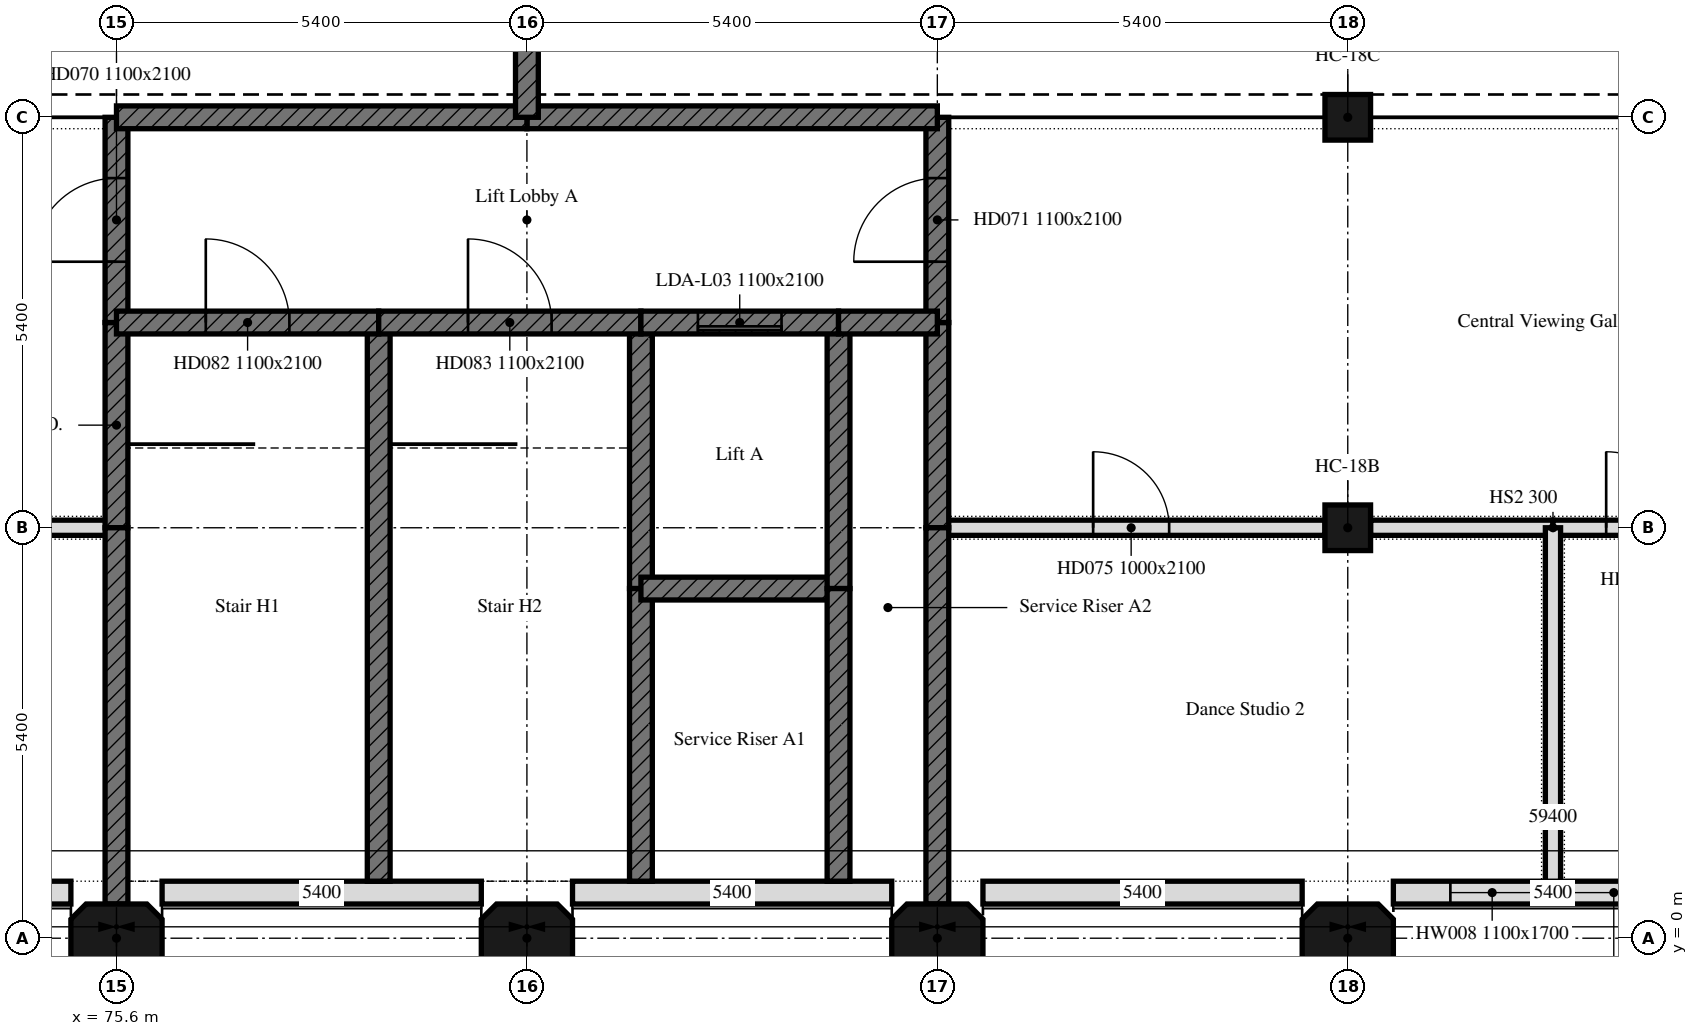
"""IFC4 building model, lengths in metres.
Left out: names, types, materials, properties, quantities, classifications, styles, units other than length and angle.
Written with IfcOpenShell. Run it as: python <this file> out.ifc"""

import sys

from ifc_helpers import new_model, si_unit, direction, frame, frame_2d, origin, origin_2d, place, context, subcontext, project, spatial, polyline, rectangle, outline, extrude, element, fill, save


model = new_model("IFC4")
c1 = context("Model", 3, precision=1e-05, world=origin(), true_north=direction((0.0, 1.0)))
c2 = subcontext(c1, "Body", "Model", "MODEL_VIEW")
j1 = project(units=[si_unit("LENGTHUNIT", "METRE"), si_unit("PLANEANGLEUNIT", "RADIAN")], contexts=[c1])
p1 = place(None, origin())
s1 = spatial("IfcSite", under=j1, at=p1, CompositionType="ELEMENT")
p2 = place(p1, origin())
s2 = spatial("IfcBuilding", under=s1, at=p2, CompositionType="ELEMENT")
p3 = place(p2, frame((0.0, 0.0, 19.8)))
s3 = spatial("IfcBuildingStorey", under=s2, at=p3, CompositionType="ELEMENT", Elevation=19.8)
for number, where, z_axis, x_axis in (
    (1, (75.6, 0.0, 0.0), (0.0, 0.0, 1.0), (1.0, 0.0, 0.0)),
    (2, (81.0, 0.0, 0.0), (0.0, 0.0, 1.0), (1.0, 0.0, 0.0)),
    (3, (86.4, 0.0, 0.0), (0.0, 0.0, 1.0), (1.0, 0.0, 0.0)),
    (4, (91.8, 0.0, 0.0), (0.0, 0.0, 1.0), (1.0, 0.0, 0.0)),
):
    element("IfcColumn", number, at=place(p3, frame(where, z_axis=z_axis, x_axis=x_axis)), inside=s3, PredefinedType="COLUMN", context=c2, shape_type="SweptSolid", body=[
        extrude(outline(polyline([(-0.4, -0.45), (0.4, -0.45), (0.6, -0.25), (0.6, 0.25), (0.4, 0.45), (-0.4, 0.45), (-0.6, 0.25), (-0.6, -0.25), (-0.4, -0.45)])), origin(), (0.0, 0.0, 1.0), 3.802),
    ])
for number, where, z_axis, x_axis in (
    (5, (91.8, 5.4, 0.0), (0.0, 0.0, 1.0), (1.0, 0.0, 0.0)),
    (6, (91.8, 10.8, 0.0), (0.0, 0.0, 1.0), (1.0, 0.0, 0.0)),
):
    element("IfcColumn", number, at=place(p3, frame(where, z_axis=z_axis, x_axis=x_axis)), inside=s3, PredefinedType="COLUMN", context=c2, shape_type="SweptSolid", body=[
        extrude(rectangle(XDim=0.6, YDim=0.6, at=origin_2d()), origin(), (0.0, 0.0, 1.0), 4.8),
    ])
p4 = place(p3, frame((70.8, 0.6, 0.0), z_axis=(0.0, 0.0, 1.0), x_axis=(1.0, 0.0, 0.0)))
e7 = element("IfcWall", 7, at=p4, inside=s3, PredefinedType="SOLIDWALL", context=c2, shape_type="SweptSolid", body=[
    extrude(outline(polyline([(0.0, 0.0), (4.2, 0.0), (4.2, 5.365), (0.0, 5.365), (0.0, 0.0)])), frame((0.0, 0.15, 0.0), z_axis=(0.0, -1.0, 0.0), x_axis=(1.0, 0.0, 0.0)), (0.0, 0.0, 1.0), 0.3),
])
p5 = place(p4, frame((0.4, 0.0, 0.9)))
e8 = element("IfcOpeningElement", 8, at=p5, cuts=e7, PredefinedType="OPENING", context=c2, shape_type="SweptSolid", body=[
    extrude(rectangle(XDim=3.4, YDim=1.7, at=frame_2d((1.7, 0.85))), frame((0.0, 0.15, 0.0), z_axis=(0.0, -1.0, 0.0), x_axis=(1.0, 0.0, 0.0)), (0.0, 0.0, 1.0), 0.3),
])
for number, where, z_axis, x_axis in (
    (9, (76.2, 0.6, 0.0), (0.0, 0.0, 1.0), (1.0, 0.0, 0.0)),
    (10, (81.6, 0.6, 0.0), (0.0, 0.0, 1.0), (1.0, 0.0, 0.0)),
    (11, (87.0, 0.6, 0.0), (0.0, 0.0, 1.0), (1.0, 0.0, 0.0)),
):
    element("IfcWall", number, at=place(p3, frame(where, z_axis=z_axis, x_axis=x_axis)), inside=s3, PredefinedType="SOLIDWALL", context=c2, shape_type="SweptSolid", body=[
        extrude(outline(polyline([(0.0, 0.0), (4.2, 0.0), (4.2, 5.365), (0.0, 5.365), (0.0, 0.0)])), frame((0.0, 0.15, 0.0), z_axis=(0.0, -1.0, 0.0), x_axis=(1.0, 0.0, 0.0)), (0.0, 0.0, 1.0), 0.3),
    ])
p6 = place(p3, frame((92.4, 0.6, 0.0), z_axis=(0.0, 0.0, 1.0), x_axis=(1.0, 0.0, 0.0)))
e12 = element("IfcWall", 12, at=p6, inside=s3, PredefinedType="SOLIDWALL", context=c2, shape_type="SweptSolid", body=[
    extrude(outline(polyline([(0.0, 0.0), (4.2, 0.0), (4.2, 5.365), (0.0, 5.365), (0.0, 0.0)])), frame((0.0, 0.15, 0.0), z_axis=(0.0, -1.0, 0.0), x_axis=(1.0, 0.0, 0.0)), (0.0, 0.0, 1.0), 0.3),
])
p7 = place(p6, frame((0.75, 0.0, 0.9)))
e13 = element("IfcOpeningElement", 13, at=p7, cuts=e12, PredefinedType="OPENING", context=c2, shape_type="SweptSolid", body=[
    extrude(rectangle(XDim=1.1, YDim=1.7, at=frame_2d((0.55, 0.85))), frame((0.0, 0.15, 0.0), z_axis=(0.0, -1.0, 0.0), x_axis=(1.0, 0.0, 0.0)), (0.0, 0.0, 1.0), 0.3),
])
p8 = place(p6, frame((2.35, 0.0, 0.9)))
e14 = element("IfcOpeningElement", 14, at=p8, cuts=e12, PredefinedType="OPENING", context=c2, shape_type="SweptSolid", body=[
    extrude(rectangle(XDim=1.1, YDim=1.7, at=frame_2d((0.55, 0.85))), frame((0.0, 0.15, 0.0), z_axis=(0.0, -1.0, 0.0), x_axis=(1.0, 0.0, 0.0)), (0.0, 0.0, 1.0), 0.3),
])
p9 = place(p3, frame((70.5, 5.4, 0.0), z_axis=(0.0, 0.0, 1.0), x_axis=(1.0, 0.0, 0.0)))
e15 = element("IfcWall", 15, at=p9, inside=s3, PredefinedType="PARTITIONING", context=c2, shape_type="SweptSolid", body=[
    extrude(rectangle(XDim=5.1, YDim=0.2, at=frame_2d((2.55, 0.0))), origin(), (0.0, 0.0, 1.0), 5.317),
])
p10 = place(p3, frame((75.6, 5.4, 0.0), z_axis=(0.0, 0.0, 1.0), x_axis=(0.0, 1.0, 0.0)))
e16 = element("IfcWall", 16, at=p10, inside=s3, PredefinedType="SHEAR", context=c2, shape_type="SweptSolid", body=[
    extrude(outline(polyline([(0.0, 0.0), (2.7, 0.0), (2.7, 6.067), (0.0, 5.344), (0.0, 0.0)])), frame((0.0, 0.15, 0.0), z_axis=(0.0, -1.0, 0.0), x_axis=(1.0, 0.0, 0.0)), (0.0, 0.0, 1.0), 0.3),
])
p11 = place(p3, frame((75.6, 8.1, 0.0), z_axis=(0.0, 0.0, 1.0), x_axis=(0.0, 1.0, 0.0)))
e17 = element("IfcWall", 17, at=p11, inside=s3, PredefinedType="SHEAR", context=c2, shape_type="SweptSolid", body=[
    extrude(outline(polyline([(0.0, 0.0), (2.7, 0.0), (2.7, 6.791), (0.0, 6.067), (0.0, 0.0)])), frame((0.0, 0.15, 0.0), z_axis=(0.0, -1.0, 0.0), x_axis=(1.0, 0.0, 0.0)), (0.0, 0.0, 1.0), 0.3),
])
p12 = place(p11, frame((0.8, 0.0, 0.0)))
e18 = element("IfcOpeningElement", 18, at=p12, cuts=e17, PredefinedType="OPENING", context=c2, shape_type="SweptSolid", body=[
    extrude(rectangle(XDim=1.1, YDim=2.1, at=frame_2d((0.55, 1.05))), frame((0.0, 0.15, 0.0), z_axis=(0.0, -1.0, 0.0), x_axis=(1.0, 0.0, 0.0)), (0.0, 0.0, 1.0), 0.3),
])
p13 = place(p3, frame((86.4, 5.4, 0.0), z_axis=(0.0, 0.0, 1.0), x_axis=(1.0, 0.0, 0.0)))
e19 = element("IfcWall", 19, at=p13, inside=s3, PredefinedType="PARTITIONING", context=c2, shape_type="SweptSolid", body=[
    extrude(rectangle(XDim=5.1, YDim=0.2, at=frame_2d((2.55, 0.0))), origin(), (0.0, 0.0, 1.0), 5.317),
])
p14 = place(p13, frame((2.05, 0.0, 0.0)))
e20 = element("IfcOpeningElement", 20, at=p14, cuts=e19, PredefinedType="OPENING", context=c2, shape_type="SweptSolid", body=[
    extrude(rectangle(XDim=1.0, YDim=2.1, at=frame_2d((0.5, 1.05))), frame((0.0, 0.1, 0.0), z_axis=(0.0, -1.0, 0.0), x_axis=(1.0, 0.0, 0.0)), (0.0, 0.0, 1.0), 0.2),
])
p15 = place(p3, frame((92.1, 5.4, 0.0), z_axis=(0.0, 0.0, 1.0), x_axis=(1.0, 0.0, 0.0)))
e21 = element("IfcWall", 21, at=p15, inside=s3, PredefinedType="PARTITIONING", context=c2, shape_type="SweptSolid", body=[
    extrude(rectangle(XDim=2.4, YDim=0.2, at=frame_2d((1.2, 0.0))), origin(), (0.0, 0.0, 1.0), 5.317),
])
p16 = place(p3, frame((94.5, 5.4, 0.0), z_axis=(0.0, 0.0, 1.0), x_axis=(1.0, 0.0, 0.0)))
e22 = element("IfcWall", 22, at=p16, inside=s3, PredefinedType="PARTITIONING", context=c2, shape_type="SweptSolid", body=[
    extrude(rectangle(XDim=2.4, YDim=0.2, at=frame_2d((1.2, 0.0))), origin(), (0.0, 0.0, 1.0), 5.317),
])
p17 = place(p16, frame((0.7, 0.0, 0.0)))
e23 = element("IfcOpeningElement", 23, at=p17, cuts=e22, PredefinedType="OPENING", context=c2, shape_type="SweptSolid", body=[
    extrude(rectangle(XDim=1.0, YDim=2.1, at=frame_2d((0.5, 1.05))), frame((0.0, 0.1, 0.0), z_axis=(0.0, -1.0, 0.0), x_axis=(1.0, 0.0, 0.0)), (0.0, 0.0, 1.0), 0.2),
])
p18 = place(p3, frame((86.4, 5.4, 0.0), z_axis=(0.0, 0.0, 1.0), x_axis=(0.0, 1.0, 0.0)))
e24 = element("IfcWall", 24, at=p18, inside=s3, PredefinedType="SHEAR", context=c2, shape_type="SweptSolid", body=[
    extrude(outline(polyline([(0.0, 0.0), (2.7, 0.0), (2.7, 6.067), (0.0, 5.344), (0.0, 0.0)])), frame((0.0, 0.15, 0.0), z_axis=(0.0, -1.0, 0.0), x_axis=(1.0, 0.0, 0.0)), (0.0, 0.0, 1.0), 0.3),
])
p19 = place(p3, frame((86.4, 8.1, 0.0), z_axis=(0.0, 0.0, 1.0), x_axis=(0.0, 1.0, 0.0)))
e25 = element("IfcWall", 25, at=p19, inside=s3, PredefinedType="SHEAR", context=c2, shape_type="SweptSolid", body=[
    extrude(outline(polyline([(0.0, 0.0), (2.7, 0.0), (2.7, 6.791), (0.0, 6.067), (0.0, 0.0)])), frame((0.0, 0.15, 0.0), z_axis=(0.0, -1.0, 0.0), x_axis=(1.0, 0.0, 0.0)), (0.0, 0.0, 1.0), 0.3),
])
p20 = place(p19, frame((0.8, 0.0, 0.0)))
e26 = element("IfcOpeningElement", 26, at=p20, cuts=e25, PredefinedType="OPENING", context=c2, shape_type="SweptSolid", body=[
    extrude(rectangle(XDim=1.1, YDim=2.1, at=frame_2d((0.55, 1.05))), frame((0.0, 0.15, 0.0), z_axis=(0.0, -1.0, 0.0), x_axis=(1.0, 0.0, 0.0)), (0.0, 0.0, 1.0), 0.3),
])
p21 = place(p3, frame((75.6, 0.45, 0.0), z_axis=(0.0, 0.0, 1.0), x_axis=(0.0, 1.0, 0.0)))
e27 = element("IfcWall", 27, at=p21, inside=s3, PredefinedType="SHEAR", context=c2, shape_type="SweptSolid", body=[
    extrude(outline(polyline([(0.0, 0.0), (4.95, 0.0), (4.95, 5.344), (0.0, 4.018), (0.0, 0.0)])), frame((0.0, 0.15, 0.0), z_axis=(0.0, -1.0, 0.0), x_axis=(1.0, 0.0, 0.0)), (0.0, 0.0, 1.0), 0.3),
])
p22 = place(p3, frame((94.5, 0.75, 0.0), z_axis=(0.0, 0.0, 1.0), x_axis=(0.0, 1.0, 0.0)))
e28 = element("IfcWall", 28, at=p22, inside=s3, PredefinedType="PARTITIONING", context=c2, shape_type="SweptSolid", body=[
    extrude(outline(polyline([(0.0, 0.0), (4.65, 0.0), (4.65, 5.344), (0.0, 4.098), (0.0, 0.0)])), frame((0.0, 0.1, 0.0), z_axis=(0.0, -1.0, 0.0), x_axis=(1.0, 0.0, 0.0)), (0.0, 0.0, 1.0), 0.2),
])
p23 = place(p3, frame((86.4, 0.45, 0.0), z_axis=(0.0, 0.0, 1.0), x_axis=(0.0, 1.0, 0.0)))
e29 = element("IfcWall", 29, at=p23, inside=s3, PredefinedType="SHEAR", context=c2, shape_type="SweptSolid", body=[
    extrude(outline(polyline([(0.0, 0.0), (4.95, 0.0), (4.95, 5.344), (0.0, 4.018), (0.0, 0.0)])), frame((0.0, 0.15, 0.0), z_axis=(0.0, -1.0, 0.0), x_axis=(1.0, 0.0, 0.0)), (0.0, 0.0, 1.0), 0.3),
])
p24 = place(p3, frame((79.05, 0.75, 0.0), z_axis=(0.0, 0.0, 1.0), x_axis=(0.0, 1.0, 0.0)))
e30 = element("IfcWall", 30, at=p24, inside=s3, PredefinedType="SHEAR", context=c2, shape_type="SweptSolid", body=[
    extrude(outline(polyline([(0.0, 0.0), (7.35, 0.0), (7.35, 6.067), (0.0, 4.098), (0.0, 0.0)])), frame((0.0, 0.15, 0.0), z_axis=(0.0, -1.0, 0.0), x_axis=(1.0, 0.0, 0.0)), (0.0, 0.0, 1.0), 0.3),
])
p25 = place(p3, frame((75.6, 8.1, 0.0), z_axis=(0.0, 0.0, 1.0), x_axis=(1.0, 0.0, 0.0)))
e31 = element("IfcWall", 31, at=p25, inside=s3, PredefinedType="SHEAR", context=c2, shape_type="SweptSolid", body=[
    extrude(rectangle(XDim=3.45, YDim=0.3, at=frame_2d((1.725, 0.0))), origin(), (0.0, 0.0, 1.0), 6.027),
])
p26 = place(p25, frame((1.175, 0.0, 0.0)))
e32 = element("IfcOpeningElement", 32, at=p26, cuts=e31, PredefinedType="OPENING", context=c2, shape_type="SweptSolid", body=[
    extrude(rectangle(XDim=1.1, YDim=2.1, at=frame_2d((0.55, 1.05))), frame((0.0, 0.15, 0.0), z_axis=(0.0, -1.0, 0.0), x_axis=(1.0, 0.0, 0.0)), (0.0, 0.0, 1.0), 0.3),
])
p27 = place(p3, frame((82.5, 4.6, 0.0), z_axis=(0.0, 0.0, 1.0), x_axis=(0.0, 1.0, 0.0)))
e33 = element("IfcWall", 33, at=p27, inside=s3, PredefinedType="SHEAR", context=c2, shape_type="SweptSolid", body=[
    extrude(outline(polyline([(0.0, 0.0), (3.5, 0.0), (3.5, 6.067), (0.0, 5.13), (0.0, 0.0)])), frame((0.0, 0.15, 0.0), z_axis=(0.0, -1.0, 0.0), x_axis=(1.0, 0.0, 0.0)), (0.0, 0.0, 1.0), 0.3),
])
p28 = place(p3, frame((82.5, 0.75, 0.0), z_axis=(0.0, 0.0, 1.0), x_axis=(0.0, 1.0, 0.0)))
e34 = element("IfcWall", 34, at=p28, inside=s3, PredefinedType="SHEAR", context=c2, shape_type="SweptSolid", body=[
    extrude(outline(polyline([(0.0, 0.0), (3.85, 0.0), (3.85, 5.13), (0.0, 4.098), (0.0, 0.0)])), frame((0.0, 0.15, 0.0), z_axis=(0.0, -1.0, 0.0), x_axis=(1.0, 0.0, 0.0)), (0.0, 0.0, 1.0), 0.3),
])
p29 = place(p3, frame((79.05, 8.1, 0.0), z_axis=(0.0, 0.0, 1.0), x_axis=(1.0, 0.0, 0.0)))
e35 = element("IfcWall", 35, at=p29, inside=s3, PredefinedType="SHEAR", context=c2, shape_type="SweptSolid", body=[
    extrude(rectangle(XDim=3.45, YDim=0.3, at=frame_2d((1.725, 0.0))), origin(), (0.0, 0.0, 1.0), 6.027),
])
p30 = place(p29, frame((1.175, 0.0, 0.0)))
e36 = element("IfcOpeningElement", 36, at=p30, cuts=e35, PredefinedType="OPENING", context=c2, shape_type="SweptSolid", body=[
    extrude(rectangle(XDim=1.1, YDim=2.1, at=frame_2d((0.55, 1.05))), frame((0.0, 0.15, 0.0), z_axis=(0.0, -1.0, 0.0), x_axis=(1.0, 0.0, 0.0)), (0.0, 0.0, 1.0), 0.3),
])
p31 = place(p3, frame((82.5, 4.6, 0.0), z_axis=(0.0, 0.0, 1.0), x_axis=(1.0, 0.0, 0.0)))
e37 = element("IfcWall", 37, at=p31, inside=s3, PredefinedType="SHEAR", context=c2, shape_type="SweptSolid", body=[
    extrude(rectangle(XDim=2.6, YDim=0.3, at=frame_2d((1.3, 0.0))), origin(), (0.0, 0.0, 1.0), 5.089),
])
p32 = place(p3, frame((85.1, 4.6, 0.0), z_axis=(0.0, 0.0, 1.0), x_axis=(0.0, 1.0, 0.0)))
e38 = element("IfcWall", 38, at=p32, inside=s3, PredefinedType="SHEAR", context=c2, shape_type="SweptSolid", body=[
    extrude(outline(polyline([(0.0, 0.0), (3.5, 0.0), (3.5, 6.067), (0.0, 5.13), (0.0, 0.0)])), frame((0.0, 0.15, 0.0), z_axis=(0.0, -1.0, 0.0), x_axis=(1.0, 0.0, 0.0)), (0.0, 0.0, 1.0), 0.3),
])
p33 = place(p3, frame((82.5, 8.1, 0.0), z_axis=(0.0, 0.0, 1.0), x_axis=(1.0, 0.0, 0.0)))
e39 = element("IfcWall", 39, at=p33, inside=s3, PredefinedType="SHEAR", context=c2, shape_type="SweptSolid", body=[
    extrude(rectangle(XDim=2.6, YDim=0.3, at=frame_2d((1.3, 0.0))), origin(), (0.0, 0.0, 1.0), 6.027),
])
p34 = place(p33, frame((0.75, 0.0, 0.0)))
e40 = element("IfcOpeningElement", 40, at=p34, cuts=e39, PredefinedType="OPENING", context=c2, shape_type="SweptSolid", body=[
    extrude(rectangle(XDim=1.1, YDim=2.1, at=frame_2d((0.55, 1.05))), frame((0.0, 0.15, 0.0), z_axis=(0.0, -1.0, 0.0), x_axis=(1.0, 0.0, 0.0)), (0.0, 0.0, 1.0), 0.3),
])
p35 = place(p3, frame((85.1, 0.75, 0.0), z_axis=(0.0, 0.0, 1.0), x_axis=(0.0, 1.0, 0.0)))
e41 = element("IfcWall", 41, at=p35, inside=s3, PredefinedType="SHEAR", context=c2, shape_type="SweptSolid", body=[
    extrude(outline(polyline([(0.0, 0.0), (3.85, 0.0), (3.85, 5.13), (0.0, 4.098), (0.0, 0.0)])), frame((0.0, 0.15, 0.0), z_axis=(0.0, -1.0, 0.0), x_axis=(1.0, 0.0, 0.0)), (0.0, 0.0, 1.0), 0.3),
])
p36 = place(p3, frame((85.1, 8.1, 0.0), z_axis=(0.0, 0.0, 1.0), x_axis=(1.0, 0.0, 0.0)))
e42 = element("IfcWall", 42, at=p36, inside=s3, PredefinedType="SHEAR", context=c2, shape_type="SweptSolid", body=[
    extrude(rectangle(XDim=1.3, YDim=0.3, at=frame_2d((0.65, 0.0))), origin(), (0.0, 0.0, 1.0), 6.027),
])
for number, where, z_axis, x_axis in (
    (43, (81.0, 10.8, 0.0), (0.0, 0.0, 1.0), (1.0, 0.0, 0.0)),
    (44, (75.6, 10.8, 0.0), (0.0, 0.0, 1.0), (1.0, 0.0, 0.0)),
):
    element("IfcWall", number, at=place(p3, frame(where, z_axis=z_axis, x_axis=x_axis)), inside=s3, PredefinedType="SHEAR", context=c2, shape_type="SweptSolid", body=[
        extrude(rectangle(XDim=5.4, YDim=0.3, at=frame_2d((2.7, 0.0))), origin(), (0.0, 0.0, 1.0), 6.751),
    ])
p37 = place(p3, frame((81.0, 10.8, 0.0), z_axis=(0.0, 0.0, 1.0), x_axis=(0.0, 1.0, 0.0)))
e45 = element("IfcWall", 45, at=p37, inside=s3, PredefinedType="SHEAR", context=c2, shape_type="SweptSolid", body=[
    extrude(outline(polyline([(0.0, 0.0), (31.95, 0.0), (31.95, 15.352), (0.0, 6.791), (0.0, 0.0)])), frame((0.0, 0.15, 0.0), z_axis=(0.0, -1.0, 0.0), x_axis=(1.0, 0.0, 0.0)), (0.0, 0.0, 1.0), 0.3),
])
p38 = place(p7, origin())
e46 = element("IfcWindow", 46, at=p38, inside=s3, PartitioningType="SINGLE_PANEL", PredefinedType="WINDOW", context=c2, shape_type="SweptSolid", body=[
    extrude(rectangle(XDim=1.1, YDim=1.7, at=frame_2d((0.55, 0.85))), frame((0.0, 0.03, 0.0), z_axis=(0.0, -1.0, 0.0), x_axis=(1.0, 0.0, 0.0)), (0.0, 0.0, 1.0), 0.06),
])
fill(e13, e46)
p39 = place(p8, origin())
e47 = element("IfcWindow", 47, at=p39, inside=s3, PartitioningType="SINGLE_PANEL", PredefinedType="WINDOW", context=c2, shape_type="SweptSolid", body=[
    extrude(rectangle(XDim=1.1, YDim=1.7, at=frame_2d((0.55, 0.85))), frame((0.0, 0.03, 0.0), z_axis=(0.0, -1.0, 0.0), x_axis=(1.0, 0.0, 0.0)), (0.0, 0.0, 1.0), 0.06),
])
fill(e14, e47)
p40 = place(p12, origin())
e48 = element("IfcDoor", 48, at=p40, inside=s3, OperationType="SINGLE_SWING_LEFT", PredefinedType="DOOR", context=c2, shape_type="SweptSolid", body=[
    extrude(rectangle(XDim=1.1, YDim=2.1, at=frame_2d((0.55, 1.05))), frame((0.0, 0.025, 0.0), z_axis=(0.0, -1.0, 0.0), x_axis=(1.0, 0.0, 0.0)), (0.0, 0.0, 1.0), 0.05),
])
fill(e18, e48)
p41 = place(p20, origin())
e49 = element("IfcDoor", 49, at=p41, inside=s3, OperationType="SINGLE_SWING_LEFT", PredefinedType="DOOR", context=c2, shape_type="SweptSolid", body=[
    extrude(rectangle(XDim=1.1, YDim=2.1, at=frame_2d((0.55, 1.05))), frame((0.0, 0.025, 0.0), z_axis=(0.0, -1.0, 0.0), x_axis=(1.0, 0.0, 0.0)), (0.0, 0.0, 1.0), 0.05),
])
fill(e26, e49)
p42 = place(p14, origin())
e50 = element("IfcDoor", 50, at=p42, inside=s3, OperationType="SINGLE_SWING_LEFT", PredefinedType="DOOR", context=c2, shape_type="SweptSolid", body=[
    extrude(rectangle(XDim=1.0, YDim=2.1, at=frame_2d((0.5, 1.05))), frame((0.0, 0.025, 0.0), z_axis=(0.0, -1.0, 0.0), x_axis=(1.0, 0.0, 0.0)), (0.0, 0.0, 1.0), 0.05),
])
fill(e20, e50)
p43 = place(p17, origin())
e51 = element("IfcDoor", 51, at=p43, inside=s3, OperationType="SINGLE_SWING_LEFT", PredefinedType="DOOR", context=c2, shape_type="SweptSolid", body=[
    extrude(rectangle(XDim=1.0, YDim=2.1, at=frame_2d((0.5, 1.05))), frame((0.0, 0.025, 0.0), z_axis=(0.0, -1.0, 0.0), x_axis=(1.0, 0.0, 0.0)), (0.0, 0.0, 1.0), 0.05),
])
fill(e23, e51)
p44 = place(p26, origin())
e52 = element("IfcDoor", 52, at=p44, inside=s3, OperationType="SINGLE_SWING_LEFT", PredefinedType="DOOR", context=c2, shape_type="SweptSolid", body=[
    extrude(rectangle(XDim=1.1, YDim=2.1, at=frame_2d((0.55, 1.05))), frame((0.0, 0.025, 0.0), z_axis=(0.0, -1.0, 0.0), x_axis=(1.0, 0.0, 0.0)), (0.0, 0.0, 1.0), 0.05),
])
fill(e32, e52)
p45 = place(p30, origin())
e53 = element("IfcDoor", 53, at=p45, inside=s3, OperationType="SINGLE_SWING_LEFT", PredefinedType="DOOR", context=c2, shape_type="SweptSolid", body=[
    extrude(rectangle(XDim=1.1, YDim=2.1, at=frame_2d((0.55, 1.05))), frame((0.0, 0.025, 0.0), z_axis=(0.0, -1.0, 0.0), x_axis=(1.0, 0.0, 0.0)), (0.0, 0.0, 1.0), 0.05),
])
fill(e36, e53)
p46 = place(p34, origin())
e54 = element("IfcDoor", 54, at=p46, inside=s3, OperationType="SLIDING_TO_LEFT", PredefinedType="DOOR", context=c2, shape_type="SweptSolid", body=[
    extrude(rectangle(XDim=1.1, YDim=2.1, at=frame_2d((0.55, 1.05))), frame((0.0, 0.025, 0.0), z_axis=(0.0, -1.0, 0.0), x_axis=(1.0, 0.0, 0.0)), (0.0, 0.0, 1.0), 0.05),
])
fill(e40, e54)
save(model, sys.argv[1])
